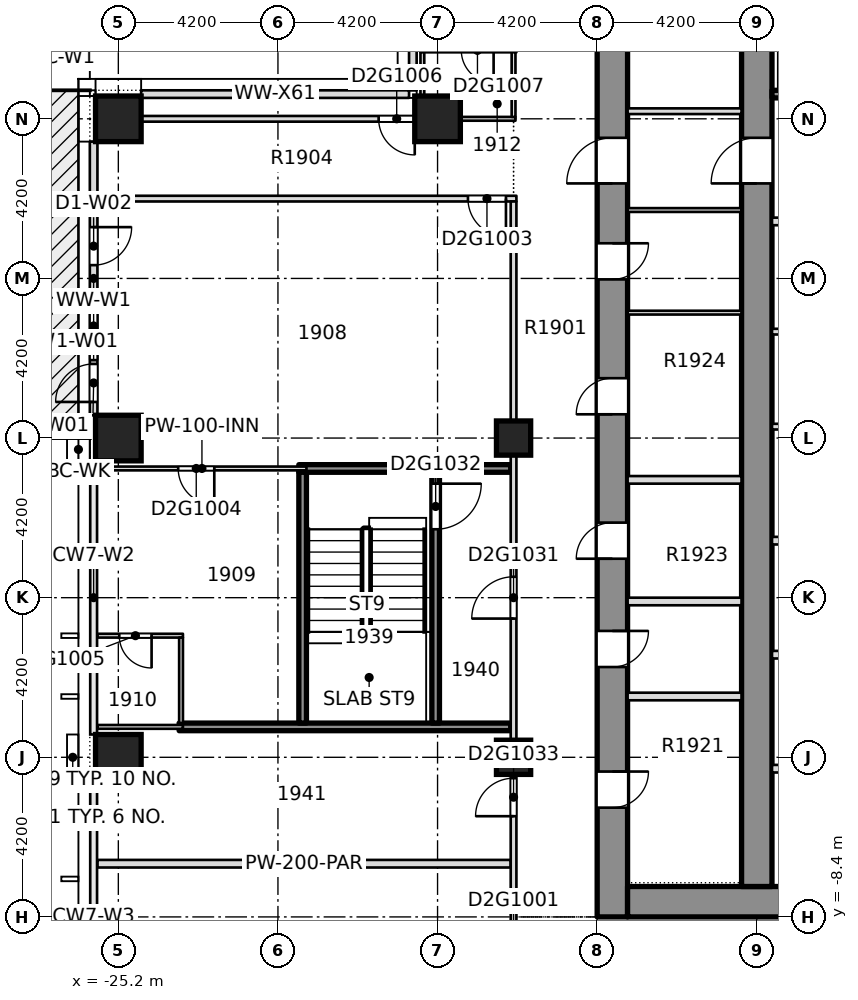
"""IFC4 building model, lengths in metres.
Left out: names, types, materials, properties, quantities, classifications, styles, units other than length and angle.
Written with IfcOpenShell. Run it as: python <this file> out.ifc"""

import sys

from ifc_helpers import new_model, si_unit, direction, frame, frame_2d, origin, place, context, subcontext, project, spatial, rectangle, extrude, element, fill, save


model = new_model("IFC4")
c1 = context("Model", 3, precision=1e-05, world=origin(), true_north=direction((0.0, 1.0)))
c2 = subcontext(c1, "Body", "Model", "MODEL_VIEW")
j1 = project(units=[si_unit("LENGTHUNIT", "METRE"), si_unit("PLANEANGLEUNIT", "RADIAN")], contexts=[c1])
p1 = place(None, origin())
s1 = spatial("IfcSite", under=j1, at=p1, CompositionType="ELEMENT")
p2 = place(p1, origin())
s2 = spatial("IfcBuilding", under=s1, at=p2, CompositionType="ELEMENT")
p3 = place(p2, frame((0.0, 0.0, 75.9)))
s3 = spatial("IfcBuildingStorey", under=s2, at=p3, CompositionType="ELEMENT", Elevation=75.9)
p4 = place(p3, frame((-12.15, -8.4, -0.5), z_axis=(0.0, 0.0, 1.0), x_axis=(0.0, 1.0, 0.0)))
e1 = element("IfcWall", 1, at=p4, inside=s3, PredefinedType="SHEAR", context=c2, shape_type="SweptSolid", body=[
    extrude(rectangle(XDim=30.15, YDim=0.9, at=frame_2d((15.075, 0.0))), origin(), (0.0, 0.0, 1.0), 4.68),
])
p5 = place(p4, frame((3.925, 0.0, 0.5)))
e2 = element("IfcOpeningElement", 2, at=p5, cuts=e1, PredefinedType="OPENING", context=c2, shape_type="SweptSolid", body=[
    extrude(rectangle(XDim=0.95, YDim=2.1, at=frame_2d((0.475, 1.05))), frame((0.0, 0.46, 0.0), z_axis=(0.0, -1.0, 0.0), x_axis=(1.0, 0.0, 0.0)), (0.0, 0.0, 1.0), 0.92),
])
p6 = place(p4, frame((9.175, 0.0, 0.5)))
e3 = element("IfcOpeningElement", 3, at=p6, cuts=e1, PredefinedType="OPENING", context=c2, shape_type="SweptSolid", body=[
    extrude(rectangle(XDim=0.95, YDim=2.1, at=frame_2d((0.475, 1.05))), frame((0.0, 0.46, 0.0), z_axis=(0.0, -1.0, 0.0), x_axis=(1.0, 0.0, 0.0)), (0.0, 0.0, 1.0), 0.92),
])
p7 = place(p4, frame((14.525, 0.0, 0.5)))
e4 = element("IfcOpeningElement", 4, at=p7, cuts=e1, PredefinedType="OPENING", context=c2, shape_type="SweptSolid", body=[
    extrude(rectangle(XDim=0.95, YDim=2.1, at=frame_2d((0.475, 1.05))), frame((0.0, 0.46, 0.0), z_axis=(0.0, -1.0, 0.0), x_axis=(1.0, 0.0, 0.0)), (0.0, 0.0, 1.0), 0.92),
])
p8 = place(p4, frame((22.225, 0.0, 0.5)))
e5 = element("IfcOpeningElement", 5, at=p8, cuts=e1, PredefinedType="OPENING", context=c2, shape_type="SweptSolid", body=[
    extrude(rectangle(XDim=0.95, YDim=2.1, at=frame_2d((0.475, 1.05))), frame((0.0, 0.46, 0.0), z_axis=(0.0, -1.0, 0.0), x_axis=(1.0, 0.0, 0.0)), (0.0, 0.0, 1.0), 0.92),
])
p9 = place(p4, frame((26.25, 0.0, 0.5)))
e6 = element("IfcOpeningElement", 6, at=p9, cuts=e1, PredefinedType="OPENING", context=c2, shape_type="SweptSolid", body=[
    extrude(rectangle(XDim=0.95, YDim=2.1, at=frame_2d((0.475, 1.05))), frame((0.0, 0.46, 0.0), z_axis=(0.0, -1.0, 0.0), x_axis=(1.0, 0.0, 0.0)), (0.0, 0.0, 1.0), 0.92),
])
p10 = place(p4, frame((19.3, 0.0, 0.5)))
e7 = element("IfcOpeningElement", 7, at=p10, cuts=e1, PredefinedType="OPENING", context=c2, shape_type="SweptSolid", body=[
    extrude(rectangle(XDim=1.2, YDim=2.1, at=frame_2d((0.6, 1.05))), frame((0.0, 0.46, 0.0), z_axis=(0.0, -1.0, 0.0), x_axis=(1.0, 0.0, 0.0)), (0.0, 0.0, 1.0), 0.92),
])
p11 = place(p3, frame((-11.7, -7.95, -0.5), z_axis=(0.0, 0.0, 1.0), x_axis=(1.0, 0.0, 0.0)))
e8 = element("IfcWall", 8, at=p11, inside=s3, PredefinedType="SHEAR", context=c2, shape_type="SweptSolid", body=[
    extrude(rectangle(XDim=23.4, YDim=0.9, at=frame_2d((11.7, 0.0))), origin(), (0.0, 0.0, 1.0), 4.68),
])
p12 = place(p11, frame((6.95, 0.0, 0.5)))
e9 = element("IfcOpeningElement", 9, at=p12, cuts=e8, PredefinedType="OPENING", context=c2, shape_type="SweptSolid", body=[
    extrude(rectangle(XDim=1.8, YDim=2.1, at=frame_2d((0.9, 1.05))), frame((0.0, 0.46, 0.0), z_axis=(0.0, -1.0, 0.0), x_axis=(1.0, 0.0, 0.0)), (0.0, 0.0, 1.0), 0.92),
])
p13 = place(p11, frame((14.65, 0.0, 0.5)))
e10 = element("IfcOpeningElement", 10, at=p13, cuts=e8, PredefinedType="OPENING", context=c2, shape_type="SweptSolid", body=[
    extrude(rectangle(XDim=1.8, YDim=2.1, at=frame_2d((0.9, 1.05))), frame((0.0, 0.46, 0.0), z_axis=(0.0, -1.0, 0.0), x_axis=(1.0, 0.0, 0.0)), (0.0, 0.0, 1.0), 0.92),
])
p14 = place(p3, frame((-8.4, -7.5, -0.5), z_axis=(0.0, 0.0, 1.0), x_axis=(0.0, 1.0, 0.0)))
e11 = element("IfcWall", 11, at=p14, inside=s3, PredefinedType="SHEAR", context=c2, shape_type="SweptSolid", body=[
    extrude(rectangle(XDim=28.35, YDim=0.9, at=frame_2d((14.175, 0.0))), origin(), (0.0, 0.0, 1.0), 4.68),
])
p15 = place(p14, frame((18.4, 0.0, 0.5)))
e12 = element("IfcOpeningElement", 12, at=p15, cuts=e11, PredefinedType="OPENING", context=c2, shape_type="SweptSolid", body=[
    extrude(rectangle(XDim=1.2, YDim=2.1, at=frame_2d((0.6, 1.05))), frame((0.0, 0.46, 0.0), z_axis=(0.0, -1.0, 0.0), x_axis=(1.0, 0.0, 0.0)), (0.0, 0.0, 1.0), 0.92),
])
for number, where, z_axis, x_axis in (
    (13, (-14.9, -4.2, 0.0), (0.0, 0.0, 1.0), (-1.0, 0.0, 0.0)),
    (14, (-14.9, 4.2, 0.0), (0.0, 0.0, 1.0), (-1.0, 0.0, 0.0)),
    (15, (-14.9, 12.6, 0.0), (0.0, 0.0, 1.0), (-1.0, 0.0, 0.0)),
):
    element("IfcWall", number, at=place(p3, frame(where, z_axis=z_axis, x_axis=x_axis)), inside=s3, PredefinedType="SHEAR", context=c2, shape_type="SweptSolid", body=[
        extrude(rectangle(XDim=10.3, YDim=0.6, at=frame_2d((5.15, 0.0))), origin(), (0.0, 0.0, 1.0), 4.18),
    ])
p16 = place(p3, frame((-22.125, -8.4, 0.0), z_axis=(0.0, 0.0, 1.0), x_axis=(1.0, 0.0, 0.0)))
e16 = element("IfcWall", 16, at=p16, inside=s3, PredefinedType="PARTITIONING", context=c2, shape_type="SweptSolid", body=[
    extrude(rectangle(XDim=7.4, YDim=0.15, at=frame_2d((3.7, 0.0))), origin(), (0.0, 0.0, 1.0), 4.18),
])
p17 = place(p16, frame((5.425, 0.0, 0.0)))
e17 = element("IfcOpeningElement", 17, at=p17, cuts=e16, PredefinedType="OPENING", context=c2, shape_type="SweptSolid", body=[
    extrude(rectangle(XDim=1.2, YDim=2.1, at=frame_2d((0.6, 1.05))), frame((0.0, 0.085, 0.0), z_axis=(0.0, -1.0, 0.0), x_axis=(1.0, 0.0, 0.0)), (0.0, 0.0, 1.0), 0.17),
])
p18 = place(p3, frame((-25.75, -4.35, 0.0), z_axis=(0.0, 0.0, 1.0), x_axis=(1.0, 0.0, 0.0)))
e18 = element("IfcWall", 18, at=p18, inside=s3, PredefinedType="PARTITIONING", context=c2, shape_type="SweptSolid", body=[
    extrude(rectangle(XDim=0.549, YDim=0.2, at=frame_2d((0.274, 0.0))), origin(), (0.0, 0.0, 1.0), 4.18),
])
p19 = place(p3, frame((-20.45, 3.507, 0.0), z_axis=(0.0, 0.0, 1.0), x_axis=(1.0, 0.0, 0.0)))
e19 = element("IfcWall", 19, at=p19, inside=s3, PredefinedType="SOLIDWALL", context=c2, shape_type="SweptSolid", body=[
    extrude(rectangle(XDim=5.575, YDim=0.2, at=frame_2d((2.788, 0.0))), origin(), (0.0, 0.0, 1.0), 4.18),
])
for number, where, z_axis, x_axis in (
    (20, (-25.75, 8.055, 0.0), (0.0, 0.0, 1.0), (1.0, 0.0, 0.0)),
    (21, (-25.75, 10.95, 0.0), (0.0, 0.0, 1.0), (1.0, 0.0, 0.0)),
):
    element("IfcWall", number, at=place(p3, frame(where, z_axis=z_axis, x_axis=x_axis)), inside=s3, PredefinedType="PARTITIONING", context=c2, shape_type="SweptSolid", body=[
        extrude(rectangle(XDim=10.875, YDim=0.2, at=frame_2d((5.438, 0.0))), origin(), (0.0, 0.0, 1.0), 4.18),
    ])
p20 = place(p3, frame((-17.35, 13.35, 0.0), z_axis=(0.0, 0.0, 1.0), x_axis=(1.0, 0.0, 0.0)))
e22 = element("IfcWall", 22, at=p20, inside=s3, PredefinedType="PARTITIONING", context=c2, shape_type="SweptSolid", body=[
    extrude(rectangle(XDim=2.475, YDim=0.2, at=frame_2d((1.238, 0.0))), origin(), (0.0, 0.0, 1.0), 4.18),
])
p21 = place(p3, frame((-22.05, -12.299, 0.0), z_axis=(0.0, 0.0, 1.0), x_axis=(0.0, 1.0, 0.0)))
e23 = element("IfcWall", 23, at=p21, inside=s3, PredefinedType="PARTITIONING", context=c2, shape_type="SweptSolid", body=[
    extrude(rectangle(XDim=3.824, YDim=0.15, at=frame_2d((1.912, 0.0))), origin(), (0.0, 0.0, 1.0), 4.18),
])
p22 = place(p3, frame((-14.8, -8.325, 0.0), z_axis=(0.0, 0.0, 1.0), x_axis=(0.0, 1.0, 0.0)))
e24 = element("IfcWall", 24, at=p22, inside=s3, PredefinedType="PARTITIONING", context=c2, shape_type="SweptSolid", body=[
    extrude(rectangle(XDim=29.875, YDim=0.15, at=frame_2d((14.938, 0.0))), origin(), (0.0, 0.0, 1.0), 4.18),
])
p23 = place(p22, frame((7.303, 0.0, 0.0)))
e25 = element("IfcOpeningElement", 25, at=p23, cuts=e24, PredefinedType="OPENING", context=c2, shape_type="SweptSolid", body=[
    extrude(rectangle(XDim=1.2, YDim=2.1, at=frame_2d((0.6, 1.05))), frame((0.0, 0.085, 0.0), z_axis=(0.0, -1.0, 0.0), x_axis=(1.0, 0.0, 0.0)), (0.0, 0.0, 1.0), 0.17),
])
p24 = place(p22, frame((13.506, 0.0, 0.0)))
e26 = element("IfcOpeningElement", 26, at=p24, cuts=e24, PredefinedType="OPENING", context=c2, shape_type="SweptSolid", body=[
    extrude(rectangle(XDim=1.2, YDim=2.1, at=frame_2d((0.6, 1.05))), frame((0.0, 0.085, 0.0), z_axis=(0.0, -1.0, 0.0), x_axis=(1.0, 0.0, 0.0)), (0.0, 0.0, 1.0), 0.17),
])
p25 = place(p22, frame((17.377, 0.0, 0.0)))
e27 = element("IfcOpeningElement", 27, at=p25, cuts=e24, PredefinedType="OPENING", context=c2, shape_type="SweptSolid", body=[
    extrude(rectangle(XDim=0.9, YDim=2.1, at=frame_2d((0.45, 1.05))), frame((0.0, 0.085, 0.0), z_axis=(0.0, -1.0, 0.0), x_axis=(1.0, 0.0, 0.0)), (0.0, 0.0, 1.0), 0.17),
])
p26 = place(p22, frame((19.375, 0.0, 0.0)))
e28 = element("IfcOpeningElement", 28, at=p26, cuts=e24, PredefinedType="OPENING", context=c2, shape_type="SweptSolid", body=[
    extrude(rectangle(XDim=1.2, YDim=2.1, at=frame_2d((0.6, 1.05))), frame((0.0, 0.085, 0.0), z_axis=(0.0, -1.0, 0.0), x_axis=(1.0, 0.0, 0.0)), (0.0, 0.0, 1.0), 0.17),
])
p27 = place(p22, frame((25.325, 0.0, 0.0)))
e29 = element("IfcOpeningElement", 29, at=p27, cuts=e24, PredefinedType="OPENING", context=c2, shape_type="SweptSolid", body=[
    extrude(rectangle(XDim=0.9, YDim=2.1, at=frame_2d((0.45, 1.05))), frame((0.0, 0.085, 0.0), z_axis=(0.0, -1.0, 0.0), x_axis=(1.0, 0.0, 0.0)), (0.0, 0.0, 1.0), 0.17),
])
for number, where, z_axis, x_axis in (
    (30, (-17.45, 20.3, 0.0), (0.0, 0.0, 1.0), (0.0, -1.0, 0.0)),
    (31, (-17.55, 13.25, 0.0), (0.0, 0.0, 1.0), (-1.0, 0.0, 0.0)),
):
    element("IfcWall", number, at=place(p3, frame(where, z_axis=z_axis, x_axis=x_axis)), inside=s3, PredefinedType="STANDARD", context=c2, shape_type="SweptSolid", body=[
        extrude(rectangle(XDim=6.95, YDim=0.2, at=frame_2d((3.475, 0.0))), origin(), (0.0, 0.0, 1.0), 4.18),
    ])
for number, where, z_axis, x_axis in (
    (32, (-25.85, 11.9, 0.0), (0.0, 0.0, 1.0), (0.0, -1.0, 0.0)),
    (33, (-25.85, 3.5, 0.0), (0.0, 0.0, 1.0), (0.0, -1.0, 0.0)),
    (34, (-25.85, -4.9, 0.0), (0.0, 0.0, 1.0), (0.0, -1.0, 0.0)),
):
    element("IfcWall", number, at=place(p3, frame(where, z_axis=z_axis, x_axis=x_axis)), inside=s3, PredefinedType="STANDARD", context=c2, shape_type="SweptSolid", body=[
        extrude(rectangle(XDim=7.0, YDim=0.2, at=frame_2d((3.5, 0.0))), origin(), (0.0, 0.0, 1.0), 4.18),
    ])
for number, where, z_axis, x_axis in (
    (35, (-7.949, -4.5, 0.0), (0.0, 0.0, 1.0), (1.0, 0.0, 0.0)),
    (36, (-7.949, -1.5, 0.0), (0.0, 0.0, 1.0), (1.0, 0.0, 0.0)),
    (37, (-7.949, 1.5, 0.0), (0.0, 0.0, 1.0), (1.0, 0.0, 0.0)),
):
    element("IfcWall", number, at=place(p3, frame(where, z_axis=z_axis, x_axis=x_axis)), inside=s3, PredefinedType="PARTITIONING", context=c2, shape_type="SweptSolid", body=[
        extrude(rectangle(XDim=2.374, YDim=0.2, at=frame_2d((1.187, 0.0))), origin(), (0.0, 0.0, 1.0), 4.18),
    ])
p28 = place(p3, frame((-7.949, 4.5, 0.0), z_axis=(0.0, 0.0, 1.0), x_axis=(1.0, 0.0, 0.0)))
e38 = element("IfcWall", 38, at=p28, inside=s3, PredefinedType="PARTITIONING", context=c2, shape_type="SweptSolid", body=[
    extrude(rectangle(XDim=2.524, YDim=0.15, at=frame_2d((1.262, 0.0))), origin(), (0.0, 0.0, 1.0), 4.18),
])
p29 = place(p3, frame((-7.949, 7.0, 0.0), z_axis=(0.0, 0.0, 1.0), x_axis=(1.0, 0.0, 0.0)))
e39 = element("IfcWall", 39, at=p29, inside=s3, PredefinedType="PARTITIONING", context=c2, shape_type="SweptSolid", body=[
    extrude(rectangle(XDim=15.898, YDim=0.15, at=frame_2d((7.949, 0.0))), origin(), (0.0, 0.0, 1.0), 4.18),
])
p30 = place(p29, frame((7.249, 0.0, 0.0)))
e40 = element("IfcOpeningElement", 40, at=p30, cuts=e39, PredefinedType="OPENING", context=c2, shape_type="SweptSolid", body=[
    extrude(rectangle(XDim=1.4, YDim=2.1, at=frame_2d((0.7, 1.05))), frame((0.0, 0.085, 0.0), z_axis=(0.0, -1.0, 0.0), x_axis=(1.0, 0.0, 0.0)), (0.0, 0.0, 1.0), 0.17),
])
p31 = place(p3, frame((-7.949, 9.9, 0.0), z_axis=(0.0, 0.0, 1.0), x_axis=(1.0, 0.0, 0.0)))
e41 = element("IfcWall", 41, at=p31, inside=s3, PredefinedType="PARTITIONING", context=c2, shape_type="SweptSolid", body=[
    extrude(rectangle(XDim=4.349, YDim=0.2, at=frame_2d((2.174, 0.0))), origin(), (0.0, 0.0, 1.0), 4.18),
])
p32 = place(p31, frame((0.999, 0.0, 0.0)))
e42 = element("IfcOpeningElement", 42, at=p32, cuts=e41, PredefinedType="OPENING", context=c2, shape_type="SweptSolid", body=[
    extrude(rectangle(XDim=1.1, YDim=2.1, at=frame_2d((0.55, 1.05))), frame((0.0, 0.11, 0.0), z_axis=(0.0, -1.0, 0.0), x_axis=(1.0, 0.0, 0.0)), (0.0, 0.0, 1.0), 0.22),
])
p33 = place(p3, frame((-7.949, 13.25, 0.0), z_axis=(0.0, 0.0, 1.0), x_axis=(1.0, 0.0, 0.0)))
e43 = element("IfcWall", 43, at=p33, inside=s3, PredefinedType="SOLIDWALL", context=c2, shape_type="SweptSolid", body=[
    extrude(rectangle(XDim=4.524, YDim=0.2, at=frame_2d((2.262, 0.0))), origin(), (0.0, 0.0, 1.0), 4.18),
])
p34 = place(p33, frame((1.499, 0.0, 0.0)))
e44 = element("IfcOpeningElement", 44, at=p34, cuts=e43, PredefinedType="OPENING", context=c2, shape_type="SweptSolid", body=[
    extrude(rectangle(XDim=1.2, YDim=2.1, at=frame_2d((0.6, 1.05))), frame((0.0, 0.11, 0.0), z_axis=(0.0, -1.0, 0.0), x_axis=(1.0, 0.0, 0.0)), (0.0, 0.0, 1.0), 0.22),
])
for number, where, z_axis, x_axis in (
    (45, (-11.699, -0.5, 0.0), (0.0, 0.0, 1.0), (1.0, 0.0, 0.0)),
    (46, (-11.699, 3.0, 0.0), (0.0, 0.0, 1.0), (1.0, 0.0, 0.0)),
):
    element("IfcWall", number, at=place(p3, frame(where, z_axis=z_axis, x_axis=x_axis)), inside=s3, PredefinedType="PARTITIONING", context=c2, shape_type="SweptSolid", body=[
        extrude(rectangle(XDim=2.848, YDim=0.2, at=frame_2d((1.424, 0.0))), origin(), (0.0, 0.0, 1.0), 4.18),
    ])
p35 = place(p3, frame((-11.699, 10.2, 0.0), z_axis=(0.0, 0.0, 1.0), x_axis=(1.0, 0.0, 0.0)))
e47 = element("IfcWall", 47, at=p35, inside=s3, PredefinedType="PARTITIONING", context=c2, shape_type="SweptSolid", body=[
    extrude(rectangle(XDim=2.848, YDim=0.15, at=frame_2d((1.424, 0.0))), origin(), (0.0, 0.0, 1.0), 4.18),
])
p36 = place(p3, frame((-11.699, 12.8, 0.0), z_axis=(0.0, 0.0, 1.0), x_axis=(1.0, 0.0, 0.0)))
e48 = element("IfcWall", 48, at=p36, inside=s3, PredefinedType="PARTITIONING", context=c2, shape_type="SweptSolid", body=[
    extrude(rectangle(XDim=2.848, YDim=0.1, at=frame_2d((1.424, 0.0))), origin(), (0.0, 0.0, 1.0), 4.18),
])
p37 = place(p3, frame((-20.45, -3.4, 0.0), z_axis=(0.0, 0.0, 1.0), x_axis=(1.0, 0.0, 0.0)))
e49 = element("IfcWall", 49, at=p37, inside=s3, PredefinedType="SOLIDWALL", context=c2, shape_type="SweptSolid", body=[
    extrude(rectangle(XDim=3.7, YDim=0.2, at=frame_2d((1.85, 0.0))), origin(), (0.0, 0.0, 1.0), 4.18),
])
for number, where, z_axis, x_axis in (
    (50, (-20.35, -3.3, 0.0), (0.0, 0.0, 1.0), (0.0, 1.0, 0.0)),
    (51, (-16.85, -3.3, 0.0), (0.0, 0.0, 1.0), (0.0, 1.0, 0.0)),
):
    element("IfcWall", number, at=place(p3, frame(where, z_axis=z_axis, x_axis=x_axis)), inside=s3, PredefinedType="SOLIDWALL", context=c2, shape_type="SweptSolid", body=[
        extrude(rectangle(XDim=6.6, YDim=0.2, at=frame_2d((3.3, 0.0))), origin(), (0.0, 0.0, 1.0), 4.18),
    ])
p38 = place(p3, frame((-25.75, 3.507, 0.0), z_axis=(0.0, 0.0, 1.0), x_axis=(1.0, 0.0, 0.0)))
e52 = element("IfcWall", 52, at=p38, inside=s3, PredefinedType="PARTITIONING", context=c2, shape_type="SweptSolid", body=[
    extrude(rectangle(XDim=5.3, YDim=0.2, at=frame_2d((2.65, 0.0))), origin(), (0.0, 0.0, 1.0), 4.18),
])
p39 = place(p17, origin())
e53 = element("IfcDoor", 53, at=p39, inside=s3, OperationType="SINGLE_SWING_LEFT", PredefinedType="DOOR", context=c2, shape_type="SweptSolid", body=[
    extrude(rectangle(XDim=1.2, YDim=2.1, at=frame_2d((0.6, 1.05))), frame((0.0, 0.025, 0.0), z_axis=(0.0, -1.0, 0.0), x_axis=(1.0, 0.0, 0.0)), (0.0, 0.0, 1.0), 0.05),
])
fill(e17, e53)
p40 = place(p23, origin())
e54 = element("IfcDoor", 54, at=p40, inside=s3, OperationType="SINGLE_SWING_RIGHT", PredefinedType="DOOR", context=c2, shape_type="SweptSolid", body=[
    extrude(rectangle(XDim=1.2, YDim=2.1, at=frame_2d((0.6, 1.05))), frame((0.0, 0.025, 0.0), z_axis=(0.0, -1.0, 0.0), x_axis=(1.0, 0.0, 0.0)), (0.0, 0.0, 1.0), 0.05),
])
fill(e25, e54)
p41 = place(p24, origin())
e55 = element("IfcDoor", 55, at=p41, inside=s3, OperationType="SINGLE_SWING_LEFT", PredefinedType="DOOR", context=c2, shape_type="SweptSolid", body=[
    extrude(rectangle(XDim=1.2, YDim=2.1, at=frame_2d((0.6, 1.05))), frame((0.0, 0.025, 0.0), z_axis=(0.0, -1.0, 0.0), x_axis=(1.0, 0.0, 0.0)), (0.0, 0.0, 1.0), 0.05),
])
fill(e26, e55)
p42 = place(p25, origin())
e56 = element("IfcDoor", 56, at=p42, inside=s3, OperationType="SINGLE_SWING_RIGHT", PredefinedType="DOOR", context=c2, shape_type="SweptSolid", body=[
    extrude(rectangle(XDim=0.9, YDim=2.1, at=frame_2d((0.45, 1.05))), frame((0.0, 0.025, 0.0), z_axis=(0.0, -1.0, 0.0), x_axis=(1.0, 0.0, 0.0)), (0.0, 0.0, 1.0), 0.05),
])
fill(e27, e56)
p43 = place(p26, origin())
e57 = element("IfcDoor", 57, at=p43, inside=s3, OperationType="SINGLE_SWING_LEFT", PredefinedType="DOOR", context=c2, shape_type="SweptSolid", body=[
    extrude(rectangle(XDim=1.2, YDim=2.1, at=frame_2d((0.6, 1.05))), frame((0.0, 0.025, 0.0), z_axis=(0.0, -1.0, 0.0), x_axis=(1.0, 0.0, 0.0)), (0.0, 0.0, 1.0), 0.05),
])
fill(e28, e57)
p44 = place(p5, origin())
e58 = element("IfcDoor", 58, at=p44, inside=s3, OperationType="SINGLE_SWING_LEFT", PredefinedType="DOOR", context=c2, shape_type="SweptSolid", body=[
    extrude(rectangle(XDim=0.95, YDim=2.1, at=frame_2d((0.475, 1.05))), frame((0.0, 0.025, 0.0), z_axis=(0.0, -1.0, 0.0), x_axis=(1.0, 0.0, 0.0)), (0.0, 0.0, 1.0), 0.05),
])
fill(e2, e58)
p45 = place(p6, origin())
e59 = element("IfcDoor", 59, at=p45, inside=s3, OperationType="SINGLE_SWING_LEFT", PredefinedType="DOOR", context=c2, shape_type="SweptSolid", body=[
    extrude(rectangle(XDim=0.95, YDim=2.1, at=frame_2d((0.475, 1.05))), frame((0.0, 0.025, 0.0), z_axis=(0.0, -1.0, 0.0), x_axis=(1.0, 0.0, 0.0)), (0.0, 0.0, 1.0), 0.05),
])
fill(e3, e59)
p46 = place(p7, origin())
e60 = element("IfcDoor", 60, at=p46, inside=s3, OperationType="SINGLE_SWING_LEFT", PredefinedType="DOOR", context=c2, shape_type="SweptSolid", body=[
    extrude(rectangle(XDim=0.95, YDim=2.1, at=frame_2d((0.475, 1.05))), frame((0.0, 0.025, 0.0), z_axis=(0.0, -1.0, 0.0), x_axis=(1.0, 0.0, 0.0)), (0.0, 0.0, 1.0), 0.05),
])
fill(e4, e60)
p47 = place(p8, origin())
e61 = element("IfcDoor", 61, at=p47, inside=s3, OperationType="SINGLE_SWING_LEFT", PredefinedType="DOOR", context=c2, shape_type="SweptSolid", body=[
    extrude(rectangle(XDim=0.95, YDim=2.1, at=frame_2d((0.475, 1.05))), frame((0.0, 0.025, 0.0), z_axis=(0.0, -1.0, 0.0), x_axis=(1.0, 0.0, 0.0)), (0.0, 0.0, 1.0), 0.05),
])
fill(e5, e61)
p48 = place(p10, origin())
e62 = element("IfcDoor", 62, at=p48, inside=s3, OperationType="SINGLE_SWING_LEFT", PredefinedType="DOOR", context=c2, shape_type="SweptSolid", body=[
    extrude(rectangle(XDim=1.2, YDim=2.1, at=frame_2d((0.6, 1.05))), frame((0.0, 0.025, 0.0), z_axis=(0.0, -1.0, 0.0), x_axis=(1.0, 0.0, 0.0)), (0.0, 0.0, 1.0), 0.05),
])
fill(e7, e62)
p49 = place(p15, origin())
e63 = element("IfcDoor", 63, at=p49, inside=s3, OperationType="SINGLE_SWING_LEFT", PredefinedType="DOOR", context=c2, shape_type="SweptSolid", body=[
    extrude(rectangle(XDim=1.2, YDim=2.1, at=frame_2d((0.6, 1.05))), frame((0.0, 0.025, 0.0), z_axis=(0.0, -1.0, 0.0), x_axis=(1.0, 0.0, 0.0)), (0.0, 0.0, 1.0), 0.05),
])
fill(e12, e63)
save(model, sys.argv[1])
